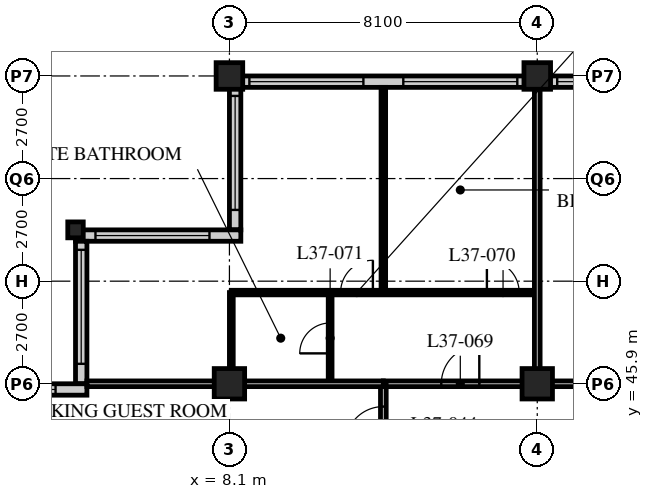
"""IFC4 building model, lengths in metres.
Left out: names, types, materials, properties, quantities, classifications, styles, units other than length and angle.
Written with IfcOpenShell. Run it as: python <this file> out.ifc"""

import sys

from ifc_helpers import new_model, si_unit, direction, frame, frame_2d, origin, origin_2d, place, context, subcontext, project, spatial, rectangle, hollow_rectangle, i_section, extrude, element, fill, save


model = new_model("IFC4")
c1 = context("Model", 3, precision=1e-05, world=origin(), true_north=direction((0.0, 1.0)))
c2 = subcontext(c1, "Body", "Model", "MODEL_VIEW")
j1 = project(units=[si_unit("LENGTHUNIT", "METRE"), si_unit("PLANEANGLEUNIT", "RADIAN")], contexts=[c1])
p1 = place(None, origin())
s1 = spatial("IfcSite", under=j1, at=p1, CompositionType="ELEMENT")
p2 = place(p1, origin())
s2 = spatial("IfcBuilding", under=s1, at=p2, CompositionType="ELEMENT")
p3 = place(p2, frame((0.0, 0.0, 144.2)))
s3 = spatial("IfcBuildingStorey", under=s2, at=p3, CompositionType="ELEMENT", Elevation=144.2)
p4 = place(p3, frame((4.05, 49.95, 0.0), z_axis=(0.0, 0.0, 1.0), x_axis=(1.0, 0.0, 0.0)))
e1 = element("IfcColumn", 1, at=p4, inside=s3, PredefinedType="COLUMN", context=c2, shape_type="SweptSolid", body=[
    extrude(i_section(OverallWidth=0.407, OverallDepth=0.419, WebThickness=0.031, FlangeThickness=0.049, FilletRadius=0.015, at=origin_2d()), origin(), (0.0, 0.0, 1.0), 3.4),
])
p5 = place(p3, frame((8.1, 45.9, 0.0), z_axis=(0.0, 0.0, 1.0), x_axis=(1.0, 0.0, 0.0)))
e2 = element("IfcColumn", 2, at=p5, inside=s3, PredefinedType="COLUMN", context=c2, shape_type="SweptSolid", body=[
    extrude(hollow_rectangle(XDim=0.8, YDim=0.8, WallThickness=0.08, at=origin_2d()), origin(), (0.0, 0.0, 1.0), 3.4),
])
p6 = place(p3, frame((8.1, 54.0, 0.0), z_axis=(0.0, 0.0, 1.0), x_axis=(1.0, 0.0, 0.0)))
e3 = element("IfcColumn", 3, at=p6, inside=s3, PredefinedType="COLUMN", context=c2, shape_type="SweptSolid", body=[
    extrude(hollow_rectangle(XDim=0.7, YDim=0.7, WallThickness=0.07, at=origin_2d()), origin(), (0.0, 0.0, 1.0), 3.4),
])
p7 = place(p3, frame((16.2, 45.9, 0.0), z_axis=(0.0, 0.0, 1.0), x_axis=(1.0, 0.0, 0.0)))
e4 = element("IfcColumn", 4, at=p7, inside=s3, PredefinedType="COLUMN", context=c2, shape_type="SweptSolid", body=[
    extrude(hollow_rectangle(XDim=0.8, YDim=0.8, WallThickness=0.08, at=origin_2d()), origin(), (0.0, 0.0, 1.0), 3.4),
])
p8 = place(p3, frame((16.2, 54.0, 0.0), z_axis=(0.0, 0.0, 1.0), x_axis=(1.0, 0.0, 0.0)))
e5 = element("IfcColumn", 5, at=p8, inside=s3, PredefinedType="COLUMN", context=c2, shape_type="SweptSolid", body=[
    extrude(hollow_rectangle(XDim=0.7, YDim=0.7, WallThickness=0.07, at=origin_2d()), origin(), (0.0, 0.0, 1.0), 3.4),
])
p9 = place(p3, frame((48.3, 53.85, 0.0), z_axis=(0.0, 0.0, 1.0), x_axis=(-1.0, 0.0, 0.0)))
e6 = element("IfcWall", 6, at=p9, inside=s3, PredefinedType="SOLIDWALL", context=c2, shape_type="SweptSolid", body=[
    extrude(rectangle(XDim=40.2, YDim=0.3, at=frame_2d((20.1, 0.0))), origin(), (0.0, 0.0, 1.0), 3.19),
])
p10 = place(p9, frame((0.225, 0.0, 0.9)))
e7 = element("IfcOpeningElement", 7, at=p10, cuts=e6, PredefinedType="OPENING", context=c2, shape_type="SweptSolid", body=[
    extrude(rectangle(XDim=3.0, YDim=1.4, at=frame_2d((1.5, 0.7))), frame((0.0, 0.16, 0.0), z_axis=(0.0, -1.0, 0.0), x_axis=(1.0, 0.0, 0.0)), (0.0, 0.0, 1.0), 0.32),
])
p11 = place(p9, frame((4.275, 0.0, 0.9)))
e8 = element("IfcOpeningElement", 8, at=p11, cuts=e6, PredefinedType="OPENING", context=c2, shape_type="SweptSolid", body=[
    extrude(rectangle(XDim=3.0, YDim=1.4, at=frame_2d((1.5, 0.7))), frame((0.0, 0.16, 0.0), z_axis=(0.0, -1.0, 0.0), x_axis=(1.0, 0.0, 0.0)), (0.0, 0.0, 1.0), 0.32),
])
p12 = place(p9, frame((8.325, 0.0, 0.9)))
e9 = element("IfcOpeningElement", 9, at=p12, cuts=e6, PredefinedType="OPENING", context=c2, shape_type="SweptSolid", body=[
    extrude(rectangle(XDim=3.0, YDim=1.4, at=frame_2d((1.5, 0.7))), frame((0.0, 0.16, 0.0), z_axis=(0.0, -1.0, 0.0), x_axis=(1.0, 0.0, 0.0)), (0.0, 0.0, 1.0), 0.32),
])
p13 = place(p9, frame((12.375, 0.0, 0.9)))
e10 = element("IfcOpeningElement", 10, at=p13, cuts=e6, PredefinedType="OPENING", context=c2, shape_type="SweptSolid", body=[
    extrude(rectangle(XDim=3.0, YDim=1.4, at=frame_2d((1.5, 0.7))), frame((0.0, 0.16, 0.0), z_axis=(0.0, -1.0, 0.0), x_axis=(1.0, 0.0, 0.0)), (0.0, 0.0, 1.0), 0.32),
])
p14 = place(p9, frame((16.425, 0.0, 0.9)))
e11 = element("IfcOpeningElement", 11, at=p14, cuts=e6, PredefinedType="OPENING", context=c2, shape_type="SweptSolid", body=[
    extrude(rectangle(XDim=3.0, YDim=1.4, at=frame_2d((1.5, 0.7))), frame((0.0, 0.16, 0.0), z_axis=(0.0, -1.0, 0.0), x_axis=(1.0, 0.0, 0.0)), (0.0, 0.0, 1.0), 0.32),
])
p15 = place(p9, frame((20.475, 0.0, 0.9)))
e12 = element("IfcOpeningElement", 12, at=p15, cuts=e6, PredefinedType="OPENING", context=c2, shape_type="SweptSolid", body=[
    extrude(rectangle(XDim=3.0, YDim=1.4, at=frame_2d((1.5, 0.7))), frame((0.0, 0.16, 0.0), z_axis=(0.0, -1.0, 0.0), x_axis=(1.0, 0.0, 0.0)), (0.0, 0.0, 1.0), 0.32),
])
p16 = place(p9, frame((24.525, 0.0, 0.9)))
e13 = element("IfcOpeningElement", 13, at=p16, cuts=e6, PredefinedType="OPENING", context=c2, shape_type="SweptSolid", body=[
    extrude(rectangle(XDim=3.0, YDim=1.4, at=frame_2d((1.5, 0.7))), frame((0.0, 0.16, 0.0), z_axis=(0.0, -1.0, 0.0), x_axis=(1.0, 0.0, 0.0)), (0.0, 0.0, 1.0), 0.32),
])
p17 = place(p9, frame((28.575, 0.0, 0.9)))
e14 = element("IfcOpeningElement", 14, at=p17, cuts=e6, PredefinedType="OPENING", context=c2, shape_type="SweptSolid", body=[
    extrude(rectangle(XDim=3.0, YDim=1.4, at=frame_2d((1.5, 0.7))), frame((0.0, 0.16, 0.0), z_axis=(0.0, -1.0, 0.0), x_axis=(1.0, 0.0, 0.0)), (0.0, 0.0, 1.0), 0.32),
])
p18 = place(p9, frame((32.625, 0.0, 0.9)))
e15 = element("IfcOpeningElement", 15, at=p18, cuts=e6, PredefinedType="OPENING", context=c2, shape_type="SweptSolid", body=[
    extrude(rectangle(XDim=3.0, YDim=1.4, at=frame_2d((1.5, 0.7))), frame((0.0, 0.16, 0.0), z_axis=(0.0, -1.0, 0.0), x_axis=(1.0, 0.0, 0.0)), (0.0, 0.0, 1.0), 0.32),
])
p19 = place(p9, frame((36.675, 0.0, 0.9)))
e16 = element("IfcOpeningElement", 16, at=p19, cuts=e6, PredefinedType="OPENING", context=c2, shape_type="SweptSolid", body=[
    extrude(rectangle(XDim=3.0, YDim=1.4, at=frame_2d((1.5, 0.7))), frame((0.0, 0.16, 0.0), z_axis=(0.0, -1.0, 0.0), x_axis=(1.0, 0.0, 0.0)), (0.0, 0.0, 1.0), 0.32),
])
p20 = place(p3, frame((8.25, 53.7, 0.0), z_axis=(0.0, 0.0, 1.0), x_axis=(0.0, -1.0, 0.0)))
e17 = element("IfcWall", 17, at=p20, inside=s3, PredefinedType="SOLIDWALL", context=c2, shape_type="SweptSolid", body=[
    extrude(rectangle(XDim=3.75, YDim=0.3, at=frame_2d((1.875, 0.0))), origin(), (0.0, 0.0, 1.0), 3.19),
])
p21 = place(p20, frame((0.225, 0.0, 0.9)))
e18 = element("IfcOpeningElement", 18, at=p21, cuts=e17, PredefinedType="OPENING", context=c2, shape_type="SweptSolid", body=[
    extrude(rectangle(XDim=3.0, YDim=1.4, at=frame_2d((1.5, 0.7))), frame((0.0, 0.16, 0.0), z_axis=(0.0, -1.0, 0.0), x_axis=(1.0, 0.0, 0.0)), (0.0, 0.0, 1.0), 0.32),
])
p22 = place(p3, frame((8.4, 49.8, 0.0), z_axis=(0.0, 0.0, 1.0), x_axis=(-1.0, 0.0, 0.0)))
e19 = element("IfcWall", 19, at=p22, inside=s3, PredefinedType="SOLIDWALL", context=c2, shape_type="SweptSolid", body=[
    extrude(rectangle(XDim=4.35, YDim=0.3, at=frame_2d((2.175, 0.0))), origin(), (0.0, 0.0, 1.0), 3.19),
])
p23 = place(p22, frame((0.825, 0.0, 0.9)))
e20 = element("IfcOpeningElement", 20, at=p23, cuts=e19, PredefinedType="OPENING", context=c2, shape_type="SweptSolid", body=[
    extrude(rectangle(XDim=3.0, YDim=1.4, at=frame_2d((1.5, 0.7))), frame((0.0, 0.16, 0.0), z_axis=(0.0, -1.0, 0.0), x_axis=(1.0, 0.0, 0.0)), (0.0, 0.0, 1.0), 0.32),
])
p24 = place(p3, frame((4.2, 49.65, 0.0), z_axis=(0.0, 0.0, 1.0), x_axis=(0.0, -1.0, 0.0)))
e21 = element("IfcWall", 21, at=p24, inside=s3, PredefinedType="SOLIDWALL", context=c2, shape_type="SweptSolid", body=[
    extrude(rectangle(XDim=3.75, YDim=0.3, at=frame_2d((1.875, 0.0))), origin(), (0.0, 0.0, 1.0), 3.19),
])
p25 = place(p24, frame((0.225, 0.0, 0.9)))
e22 = element("IfcOpeningElement", 22, at=p25, cuts=e21, PredefinedType="OPENING", context=c2, shape_type="SweptSolid", body=[
    extrude(rectangle(XDim=3.0, YDim=1.4, at=frame_2d((1.5, 0.7))), frame((0.0, 0.16, 0.0), z_axis=(0.0, -1.0, 0.0), x_axis=(1.0, 0.0, 0.0)), (0.0, 0.0, 1.0), 0.32),
])
p26 = place(p3, frame((4.35, 45.75, 0.0), z_axis=(0.0, 0.0, 1.0), x_axis=(-1.0, 0.0, 0.0)))
e23 = element("IfcWall", 23, at=p26, inside=s3, PredefinedType="SOLIDWALL", context=c2, shape_type="SweptSolid", body=[
    extrude(rectangle(XDim=4.35, YDim=0.3, at=frame_2d((2.175, 0.0))), origin(), (0.0, 0.0, 1.0), 3.19),
])
p27 = place(p26, frame((0.825, 0.0, 0.9)))
e24 = element("IfcOpeningElement", 24, at=p27, cuts=e23, PredefinedType="OPENING", context=c2, shape_type="SweptSolid", body=[
    extrude(rectangle(XDim=3.0, YDim=1.4, at=frame_2d((1.5, 0.7))), frame((0.0, 0.16, 0.0), z_axis=(0.0, -1.0, 0.0), x_axis=(1.0, 0.0, 0.0)), (0.0, 0.0, 1.0), 0.32),
])
p28 = place(p3, frame((12.15, 45.9, 0.0), z_axis=(0.0, 0.0, 1.0), x_axis=(1.0, 0.0, 0.0)))
e25 = element("IfcWall", 25, at=p28, inside=s3, PredefinedType="PARTITIONING", context=c2, shape_type="SweptSolid", body=[
    extrude(rectangle(XDim=36.45, YDim=0.15, at=frame_2d((18.225, 0.0))), origin(), (0.0, 0.0, 1.0), 2.42),
])
p29 = place(p28, frame((9.225, 0.0, 0.0)))
e26 = element("IfcOpeningElement", 26, at=p29, cuts=e25, PredefinedType="OPENING", context=c2, shape_type="SweptSolid", body=[
    extrude(rectangle(XDim=1.8, YDim=2.4, at=frame_2d((0.9, 1.2))), frame((0.0, 0.085, 0.0), z_axis=(0.0, -1.0, 0.0), x_axis=(1.0, 0.0, 0.0)), (0.0, 0.0, 1.0), 0.17),
])
p30 = place(p28, frame((21.65, 0.0, 0.0)))
e27 = element("IfcOpeningElement", 27, at=p30, cuts=e25, PredefinedType="OPENING", context=c2, shape_type="SweptSolid", body=[
    extrude(rectangle(XDim=1.0, YDim=2.1, at=frame_2d((0.5, 1.05))), frame((0.0, 0.085, 0.0), z_axis=(0.0, -1.0, 0.0), x_axis=(1.0, 0.0, 0.0)), (0.0, 0.0, 1.0), 0.17),
])
p31 = place(p28, frame((24.9, 0.0, 0.0)))
e28 = element("IfcOpeningElement", 28, at=p31, cuts=e25, PredefinedType="OPENING", context=c2, shape_type="SweptSolid", body=[
    extrude(rectangle(XDim=1.0, YDim=2.1, at=frame_2d((0.5, 1.05))), frame((0.0, 0.085, 0.0), z_axis=(0.0, -1.0, 0.0), x_axis=(1.0, 0.0, 0.0)), (0.0, 0.0, 1.0), 0.17),
])
p32 = place(p28, frame((30.8, 0.0, 0.0)))
e29 = element("IfcOpeningElement", 29, at=p32, cuts=e25, PredefinedType="OPENING", context=c2, shape_type="SweptSolid", body=[
    extrude(rectangle(XDim=1.0, YDim=2.1, at=frame_2d((0.5, 1.05))), frame((0.0, 0.085, 0.0), z_axis=(0.0, -1.0, 0.0), x_axis=(1.0, 0.0, 0.0)), (0.0, 0.0, 1.0), 0.17),
])
p33 = place(p28, frame((32.825, 0.0, 0.0)))
e30 = element("IfcOpeningElement", 30, at=p33, cuts=e25, PredefinedType="OPENING", context=c2, shape_type="SweptSolid", body=[
    extrude(rectangle(XDim=1.0, YDim=2.1, at=frame_2d((0.5, 1.05))), frame((0.0, 0.085, 0.0), z_axis=(0.0, -1.0, 0.0), x_axis=(1.0, 0.0, 0.0)), (0.0, 0.0, 1.0), 0.17),
])
p34 = place(p28, frame((1.525, 0.0, 0.0)))
e31 = element("IfcOpeningElement", 31, at=p34, cuts=e25, PredefinedType="OPENING", context=c2, shape_type="SweptSolid", body=[
    extrude(rectangle(XDim=1.0, YDim=2.1, at=frame_2d((0.5, 1.05))), frame((0.0, 0.085, 0.0), z_axis=(0.0, -1.0, 0.0), x_axis=(1.0, 0.0, 0.0)), (0.0, 0.0, 1.0), 0.17),
])
p35 = place(p3, frame((12.15, 21.6, 0.0), z_axis=(0.0, 0.0, 1.0), x_axis=(0.0, 1.0, 0.0)))
e32 = element("IfcWall", 32, at=p35, inside=s3, PredefinedType="PARTITIONING", context=c2, shape_type="SweptSolid", body=[
    extrude(rectangle(XDim=24.3, YDim=0.15, at=frame_2d((12.15, 0.0))), origin(), (0.0, 0.0, 1.0), 3.19),
])
p36 = place(p35, frame((5.575, 0.0, 0.0)))
e33 = element("IfcOpeningElement", 33, at=p36, cuts=e32, PredefinedType="OPENING", context=c2, shape_type="SweptSolid", body=[
    extrude(rectangle(XDim=1.0, YDim=2.1, at=frame_2d((0.5, 1.05))), frame((0.0, 0.085, 0.0), z_axis=(0.0, -1.0, 0.0), x_axis=(1.0, 0.0, 0.0)), (0.0, 0.0, 1.0), 0.17),
])
p37 = place(p35, frame((14.05, 0.0, 0.0)))
e34 = element("IfcOpeningElement", 34, at=p37, cuts=e32, PredefinedType="OPENING", context=c2, shape_type="SweptSolid", body=[
    extrude(rectangle(XDim=1.0, YDim=2.1, at=frame_2d((0.5, 1.05))), frame((0.0, 0.085, 0.0), z_axis=(0.0, -1.0, 0.0), x_axis=(1.0, 0.0, 0.0)), (0.0, 0.0, 1.0), 0.17),
])
p38 = place(p35, frame((22.7, 0.0, 0.0)))
e35 = element("IfcOpeningElement", 35, at=p38, cuts=e32, PredefinedType="OPENING", context=c2, shape_type="SweptSolid", body=[
    extrude(rectangle(XDim=1.0, YDim=2.1, at=frame_2d((0.5, 1.05))), frame((0.0, 0.085, 0.0), z_axis=(0.0, -1.0, 0.0), x_axis=(1.0, 0.0, 0.0)), (0.0, 0.0, 1.0), 0.17),
])
p39 = place(p3, frame((10.75, 45.9, 0.0), z_axis=(0.0, 0.0, 1.0), x_axis=(0.0, 1.0, 0.0)))
e36 = element("IfcWall", 36, at=p39, inside=s3, PredefinedType="PARTITIONING", context=c2, shape_type="SweptSolid", body=[
    extrude(rectangle(XDim=2.4, YDim=0.1, at=frame_2d((1.2, 0.0))), origin(), (0.0, 0.0, 1.0), 3.19),
])
p40 = place(p39, frame((0.8, 0.0, 0.0)))
e37 = element("IfcOpeningElement", 37, at=p40, cuts=e36, PredefinedType="OPENING", context=c2, shape_type="SweptSolid", body=[
    extrude(rectangle(XDim=0.8, YDim=2.1, at=frame_2d((0.4, 1.05))), frame((0.0, 0.06, 0.0), z_axis=(0.0, -1.0, 0.0), x_axis=(1.0, 0.0, 0.0)), (0.0, 0.0, 1.0), 0.12),
])
p41 = place(p3, frame((8.15, 45.9, 0.0), z_axis=(0.0, 0.0, 1.0), x_axis=(0.0, 1.0, 0.0)))
e38 = element("IfcWall", 38, at=p41, inside=s3, PredefinedType="PARTITIONING", context=c2, shape_type="SweptSolid", body=[
    extrude(rectangle(XDim=2.4, YDim=0.1, at=frame_2d((1.2, 0.0))), origin(), (0.0, 0.0, 1.0), 2.42),
])
p42 = place(p3, frame((8.15, 48.3, 0.0), z_axis=(0.0, 0.0, 1.0), x_axis=(1.0, 0.0, 0.0)))
e39 = element("IfcWall", 39, at=p42, inside=s3, PredefinedType="PARTITIONING", context=c2, shape_type="SweptSolid", body=[
    extrude(rectangle(XDim=8.05, YDim=0.12, at=frame_2d((4.025, 0.0))), origin(), (0.0, 0.0, 1.0), 3.19),
])
p43 = place(p42, frame((6.725, 0.0, 0.0)))
e40 = element("IfcOpeningElement", 40, at=p43, cuts=e39, PredefinedType="OPENING", context=c2, shape_type="SweptSolid", body=[
    extrude(rectangle(XDim=0.85, YDim=2.1, at=frame_2d((0.425, 1.05))), frame((0.0, 0.07, 0.0), z_axis=(0.0, -1.0, 0.0), x_axis=(1.0, 0.0, 0.0)), (0.0, 0.0, 1.0), 0.14),
])
p44 = place(p42, frame((2.875, 0.0, 0.0)))
e41 = element("IfcOpeningElement", 41, at=p44, cuts=e39, PredefinedType="OPENING", context=c2, shape_type="SweptSolid", body=[
    extrude(rectangle(XDim=0.85, YDim=2.1, at=frame_2d((0.425, 1.05))), frame((0.0, 0.07, 0.0), z_axis=(0.0, -1.0, 0.0), x_axis=(1.0, 0.0, 0.0)), (0.0, 0.0, 1.0), 0.14),
])
p45 = place(p3, frame((12.15, 48.3, 0.0), z_axis=(0.0, 0.0, 1.0), x_axis=(0.0, 1.0, 0.0)))
e42 = element("IfcWall", 42, at=p45, inside=s3, PredefinedType="PARTITIONING", context=c2, shape_type="SweptSolid", body=[
    extrude(rectangle(XDim=5.4, YDim=0.12, at=frame_2d((2.7, 0.0))), origin(), (0.0, 0.0, 1.0), 3.19),
])
p46 = place(p3, frame((4.35, 45.9, 0.0), z_axis=(0.0, 0.0, 1.0), x_axis=(1.0, 0.0, 0.0)))
e43 = element("IfcWall", 43, at=p46, inside=s3, PredefinedType="PARTITIONING", context=c2, shape_type="SweptSolid", body=[
    extrude(rectangle(XDim=7.8, YDim=0.15, at=frame_2d((3.9, 0.0))), origin(), (0.0, 0.0, 1.0), 2.42),
])
p47 = place(p3, frame((16.2, 45.9, 0.0), z_axis=(0.0, 0.0, 1.0), x_axis=(0.0, 1.0, 0.0)))
e44 = element("IfcWall", 44, at=p47, inside=s3, PredefinedType="PARTITIONING", context=c2, shape_type="SweptSolid", body=[
    extrude(rectangle(XDim=7.8, YDim=0.15, at=frame_2d((3.9, 0.0))), origin(), (0.0, 0.0, 1.0), 2.42),
])
p48 = place(p17, origin())
e45 = element("IfcWindow", 45, at=p48, inside=s3, PartitioningType="SINGLE_PANEL", PredefinedType="WINDOW", context=c2, shape_type="SweptSolid", body=[
    extrude(rectangle(XDim=3.0, YDim=1.4, at=frame_2d((1.5, 0.7))), frame((0.0, 0.03, 0.0), z_axis=(0.0, -1.0, 0.0), x_axis=(1.0, 0.0, 0.0)), (0.0, 0.0, 1.0), 0.06),
])
fill(e14, e45)
p49 = place(p18, origin())
e46 = element("IfcWindow", 46, at=p49, inside=s3, PartitioningType="SINGLE_PANEL", PredefinedType="WINDOW", context=c2, shape_type="SweptSolid", body=[
    extrude(rectangle(XDim=3.0, YDim=1.4, at=frame_2d((1.5, 0.7))), frame((0.0, 0.03, 0.0), z_axis=(0.0, -1.0, 0.0), x_axis=(1.0, 0.0, 0.0)), (0.0, 0.0, 1.0), 0.06),
])
fill(e15, e46)
p50 = place(p19, origin())
e47 = element("IfcWindow", 47, at=p50, inside=s3, PartitioningType="SINGLE_PANEL", PredefinedType="WINDOW", context=c2, shape_type="SweptSolid", body=[
    extrude(rectangle(XDim=3.0, YDim=1.4, at=frame_2d((1.5, 0.7))), frame((0.0, 0.03, 0.0), z_axis=(0.0, -1.0, 0.0), x_axis=(1.0, 0.0, 0.0)), (0.0, 0.0, 1.0), 0.06),
])
fill(e16, e47)
p51 = place(p21, origin())
e48 = element("IfcWindow", 48, at=p51, inside=s3, PartitioningType="SINGLE_PANEL", PredefinedType="WINDOW", context=c2, shape_type="SweptSolid", body=[
    extrude(rectangle(XDim=3.0, YDim=1.4, at=frame_2d((1.5, 0.7))), frame((0.0, 0.03, 0.0), z_axis=(0.0, -1.0, 0.0), x_axis=(1.0, 0.0, 0.0)), (0.0, 0.0, 1.0), 0.06),
])
fill(e18, e48)
p52 = place(p23, origin())
e49 = element("IfcWindow", 49, at=p52, inside=s3, PartitioningType="SINGLE_PANEL", PredefinedType="WINDOW", context=c2, shape_type="SweptSolid", body=[
    extrude(rectangle(XDim=3.0, YDim=1.4, at=frame_2d((1.5, 0.7))), frame((0.0, 0.03, 0.0), z_axis=(0.0, -1.0, 0.0), x_axis=(1.0, 0.0, 0.0)), (0.0, 0.0, 1.0), 0.06),
])
fill(e20, e49)
p53 = place(p25, origin())
e50 = element("IfcWindow", 50, at=p53, inside=s3, PartitioningType="SINGLE_PANEL", PredefinedType="WINDOW", context=c2, shape_type="SweptSolid", body=[
    extrude(rectangle(XDim=3.0, YDim=1.4, at=frame_2d((1.5, 0.7))), frame((0.0, 0.03, 0.0), z_axis=(0.0, -1.0, 0.0), x_axis=(1.0, 0.0, 0.0)), (0.0, 0.0, 1.0), 0.06),
])
fill(e22, e50)
p54 = place(p27, origin())
e51 = element("IfcWindow", 51, at=p54, inside=s3, PartitioningType="SINGLE_PANEL", PredefinedType="WINDOW", context=c2, shape_type="SweptSolid", body=[
    extrude(rectangle(XDim=3.0, YDim=1.4, at=frame_2d((1.5, 0.7))), frame((0.0, 0.03, 0.0), z_axis=(0.0, -1.0, 0.0), x_axis=(1.0, 0.0, 0.0)), (0.0, 0.0, 1.0), 0.06),
])
fill(e24, e51)
p55 = place(p38, origin())
e52 = element("IfcDoor", 52, at=p55, inside=s3, OperationType="SINGLE_SWING_LEFT", PredefinedType="DOOR", context=c2, shape_type="SweptSolid", body=[
    extrude(rectangle(XDim=1.0, YDim=2.1, at=frame_2d((0.5, 1.05))), frame((0.0, 0.025, 0.0), z_axis=(0.0, -1.0, 0.0), x_axis=(1.0, 0.0, 0.0)), (0.0, 0.0, 1.0), 0.05),
])
fill(e35, e52)
p56 = place(p34, origin())
e53 = element("IfcDoor", 53, at=p56, inside=s3, OperationType="SINGLE_SWING_RIGHT", PredefinedType="DOOR", context=c2, shape_type="SweptSolid", body=[
    extrude(rectangle(XDim=1.0, YDim=2.1, at=frame_2d((0.5, 1.05))), frame((0.0, 0.025, 0.0), z_axis=(0.0, -1.0, 0.0), x_axis=(1.0, 0.0, 0.0)), (0.0, 0.0, 1.0), 0.05),
])
fill(e31, e53)
p57 = place(p43, origin())
e54 = element("IfcDoor", 54, at=p57, inside=s3, OperationType="SINGLE_SWING_LEFT", PredefinedType="DOOR", context=c2, shape_type="SweptSolid", body=[
    extrude(rectangle(XDim=0.85, YDim=2.1, at=frame_2d((0.425, 1.05))), frame((0.0, 0.025, 0.0), z_axis=(0.0, -1.0, 0.0), x_axis=(1.0, 0.0, 0.0)), (0.0, 0.0, 1.0), 0.05),
])
fill(e40, e54)
p58 = place(p40, origin())
e55 = element("IfcDoor", 55, at=p58, inside=s3, OperationType="SINGLE_SWING_LEFT", PredefinedType="DOOR", context=c2, shape_type="SweptSolid", body=[
    extrude(rectangle(XDim=0.8, YDim=2.1, at=frame_2d((0.4, 1.05))), frame((0.0, 0.025, 0.0), z_axis=(0.0, -1.0, 0.0), x_axis=(1.0, 0.0, 0.0)), (0.0, 0.0, 1.0), 0.05),
])
fill(e37, e55)
p59 = place(p44, origin())
e56 = element("IfcDoor", 56, at=p59, inside=s3, OperationType="SINGLE_SWING_RIGHT", PredefinedType="DOOR", context=c2, shape_type="SweptSolid", body=[
    extrude(rectangle(XDim=0.85, YDim=2.1, at=frame_2d((0.425, 1.05))), frame((0.0, 0.025, 0.0), z_axis=(0.0, -1.0, 0.0), x_axis=(1.0, 0.0, 0.0)), (0.0, 0.0, 1.0), 0.05),
])
fill(e41, e56)
save(model, sys.argv[1])
